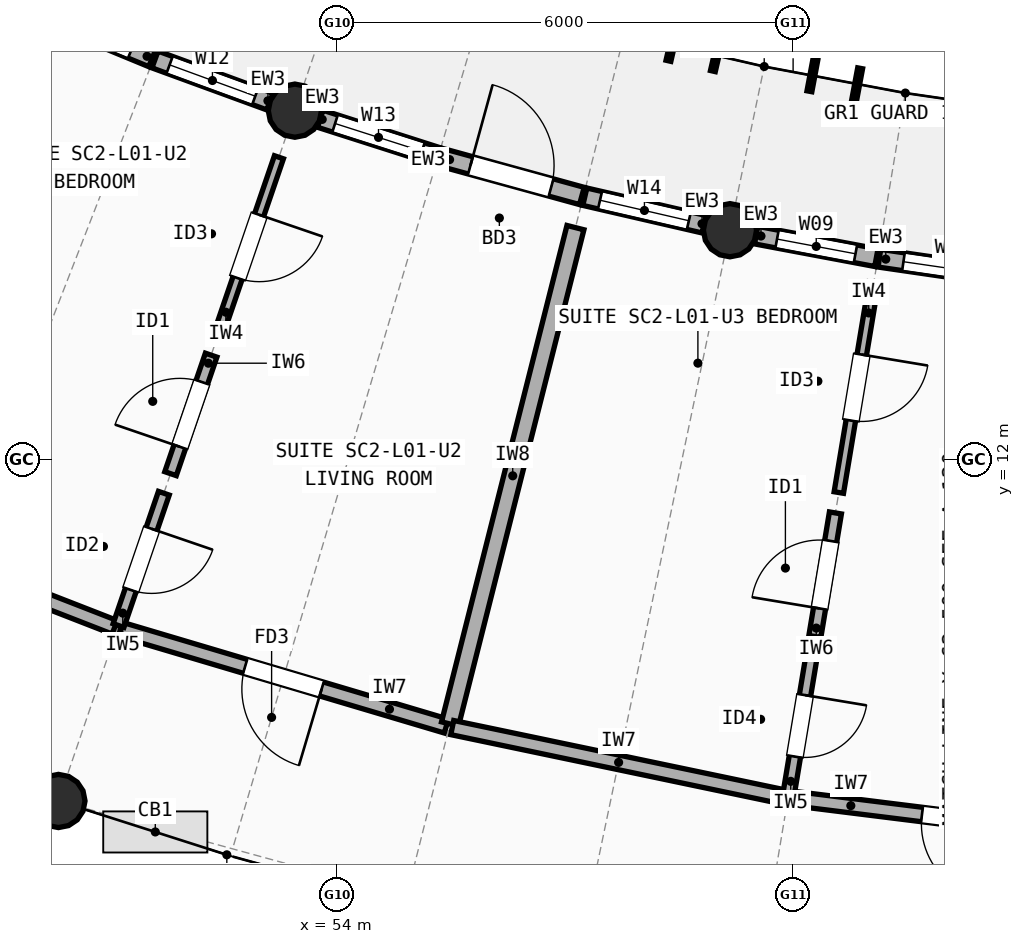
"""IFC4 building model, lengths in metres.
Left out: names, types, materials, properties, quantities, classifications, styles, units other than length and angle.
Written with IfcOpenShell. Run it as: python <this file> out.ifc"""

import sys

from ifc_helpers import new_model, si_unit, direction, frame, frame_2d, origin, origin_2d, place, context, subcontext, project, spatial, rectangle, circle, extrude, element, fill, save


model = new_model("IFC4")
c1 = context("Model", 3, precision=1e-05, world=origin(), true_north=direction((0.0, 1.0)))
c2 = subcontext(c1, "Body", "Model", "MODEL_VIEW")
j1 = project(units=[si_unit("LENGTHUNIT", "METRE"), si_unit("PLANEANGLEUNIT", "RADIAN")], contexts=[c1])
p1 = place(None, origin())
s1 = spatial("IfcSite", under=j1, at=p1, CompositionType="ELEMENT")
p2 = place(p1, origin())
s2 = spatial("IfcBuilding", under=s1, at=p2, CompositionType="ELEMENT")
p3 = place(p2, frame((0.0, 0.0, 4.5)))
s3 = spatial("IfcBuildingStorey", under=s2, at=p3, CompositionType="ELEMENT", Elevation=4.5)
for number, where, z_axis, x_axis in (
    (1, (53.445, 16.59, 0.0), (0.0, 0.0, 1.0), (1.0, 0.0, 0.0)),
    (2, (50.334, 7.508, 0.0), (0.0, 0.0, 1.0), (1.0, 0.0, 0.0)),
    (3, (59.169, 15.018, 0.0), (0.0, 0.0, 1.0), (1.0, 0.0, 0.0)),
):
    element("IfcColumn", number, at=place(p3, frame(where, z_axis=z_axis, x_axis=x_axis)), inside=s3, PredefinedType="COLUMN", context=c2, shape_type="SweptSolid", body=[
        extrude(circle(Radius=0.35, at=origin_2d()), origin(), (0.0, 0.0, 1.0), 2.948),
    ])
p4 = place(p3, frame((49.774, 18.019, 0.0), z_axis=(0.0, 0.0, 1.0), x_axis=(0.92414555515, -0.382040564465, 0.0)))
e4 = element("IfcWall", 4, at=p4, inside=s3, PredefinedType="STANDARD", context=c2, shape_type="SweptSolid", body=[
    extrude(rectangle(XDim=1.94, YDim=0.235, at=frame_2d((0.97, 0.0))), origin(), (0.0, 0.0, 1.0), 2.684),
])
p5 = place(p4, frame((0.295, 0.0, 0.85)))
e5 = element("IfcOpeningElement", 5, at=p5, cuts=e4, PredefinedType="OPENING", context=c2, shape_type="SweptSolid", body=[
    extrude(rectangle(XDim=1.35, YDim=1.5, at=frame_2d((0.675, 0.75))), frame((0.0, 0.127, 0.0), z_axis=(0.0, -1.0, 0.0), x_axis=(1.0, 0.0, 0.0)), (0.0, 0.0, 1.0), 0.255),
])
p6 = place(p3, frame((51.604, 17.264, 0.0), z_axis=(0.0, 0.0, 1.0), x_axis=(0.939176538502, -0.34343475294, 0.0)))
e6 = element("IfcWall", 6, at=p6, inside=s3, PredefinedType="STANDARD", context=c2, shape_type="SweptSolid", body=[
    extrude(rectangle(XDim=1.61, YDim=0.235, at=frame_2d((0.805, 0.0))), origin(), (0.0, 0.0, 1.0), 2.684),
])
p7 = place(p6, frame((0.205, 0.0, 0.85)))
e7 = element("IfcOpeningElement", 7, at=p7, cuts=e6, PredefinedType="OPENING", context=c2, shape_type="SweptSolid", body=[
    extrude(rectangle(XDim=1.2, YDim=1.35, at=frame_2d((0.6, 0.675))), frame((0.0, 0.127, 0.0), z_axis=(0.0, -1.0, 0.0), x_axis=(1.0, 0.0, 0.0)), (0.0, 0.0, 1.0), 0.255),
])
p8 = place(p3, frame((53.778, 16.484, 0.0), z_axis=(0.0, 0.0, 1.0), x_axis=(0.952508629145, -0.304511594861, 0.0)))
e8 = element("IfcWall", 8, at=p8, inside=s3, PredefinedType="STANDARD", context=c2, shape_type="SweptSolid", body=[
    extrude(rectangle(XDim=1.61, YDim=0.235, at=frame_2d((0.805, 0.0))), origin(), (0.0, 0.0, 1.0), 2.684),
])
p9 = place(p8, frame((0.205, 0.0, 0.85)))
e9 = element("IfcOpeningElement", 9, at=p9, cuts=e8, PredefinedType="OPENING", context=c2, shape_type="SweptSolid", body=[
    extrude(rectangle(XDim=1.2, YDim=1.45, at=frame_2d((0.6, 0.725))), frame((0.0, 0.127, 0.0), z_axis=(0.0, -1.0, 0.0), x_axis=(1.0, 0.0, 0.0)), (0.0, 0.0, 1.0), 0.255),
])
p10 = place(p3, frame((55.35, 15.982, 0.0), z_axis=(0.0, 0.0, 1.0), x_axis=(0.964271323293, -0.264916619098, 0.0)))
e10 = element("IfcWall", 10, at=p10, inside=s3, PredefinedType="STANDARD", context=c2, shape_type="SweptSolid", body=[
    extrude(rectangle(XDim=1.94, YDim=0.235, at=frame_2d((0.97, 0.0))), origin(), (0.0, 0.0, 1.0), 2.684),
])
p11 = place(p10, frame((0.42, 0.0, 0.0)))
e11 = element("IfcOpeningElement", 11, at=p11, cuts=e10, PredefinedType="OPENING", context=c2, shape_type="SweptSolid", body=[
    extrude(rectangle(XDim=1.1, YDim=2.15, at=frame_2d((0.55, 1.075))), frame((0.0, 0.127, 0.0), z_axis=(0.0, -1.0, 0.0), x_axis=(1.0, 0.0, 0.0)), (0.0, 0.0, 1.0), 0.255),
])
p12 = place(p3, frame((57.26, 15.458, 0.0), z_axis=(0.0, 0.0, 1.0), x_axis=(0.974355406192, -0.225014538249, 0.0)))
e12 = element("IfcWall", 12, at=p12, inside=s3, PredefinedType="STANDARD", context=c2, shape_type="SweptSolid", body=[
    extrude(rectangle(XDim=1.61, YDim=0.235, at=frame_2d((0.805, 0.0))), origin(), (0.0, 0.0, 1.0), 2.684),
])
p13 = place(p12, frame((0.205, 0.0, 0.85)))
e13 = element("IfcOpeningElement", 13, at=p13, cuts=e12, PredefinedType="OPENING", context=c2, shape_type="SweptSolid", body=[
    extrude(rectangle(XDim=1.2, YDim=1.5, at=frame_2d((0.6, 0.75))), frame((0.0, 0.127, 0.0), z_axis=(0.0, -1.0, 0.0), x_axis=(1.0, 0.0, 0.0)), (0.0, 0.0, 1.0), 0.255),
])
p14 = place(p3, frame((59.513, 14.953, 0.0), z_axis=(0.0, 0.0, 1.0), x_axis=(0.982827529128, -0.184526550902, 0.0)))
e14 = element("IfcWall", 14, at=p14, inside=s3, PredefinedType="STANDARD", context=c2, shape_type="SweptSolid", body=[
    extrude(rectangle(XDim=1.61, YDim=0.235, at=frame_2d((0.805, 0.0))), origin(), (0.0, 0.0, 1.0), 2.684),
])
p15 = place(p14, frame((0.28, 0.0, 0.85)))
e15 = element("IfcOpeningElement", 15, at=p15, cuts=e14, PredefinedType="OPENING", context=c2, shape_type="SweptSolid", body=[
    extrude(rectangle(XDim=1.05, YDim=1.35, at=frame_2d((0.525, 0.675))), frame((0.0, 0.127, 0.0), z_axis=(0.0, -1.0, 0.0), x_axis=(1.0, 0.0, 0.0)), (0.0, 0.0, 1.0), 0.255),
])
p16 = place(p3, frame((61.135, 14.649, 0.0), z_axis=(0.0, 0.0, 1.0), x_axis=(0.989601751146, -0.14383453733, 0.0)))
e16 = element("IfcWall", 16, at=p16, inside=s3, PredefinedType="STANDARD", context=c2, shape_type="SweptSolid", body=[
    extrude(rectangle(XDim=1.94, YDim=0.235, at=frame_2d((0.97, 0.0))), origin(), (0.0, 0.0, 1.0), 2.684),
])
p17 = place(p16, frame((0.32, 0.0, 0.85)))
e17 = element("IfcOpeningElement", 17, at=p17, cuts=e16, PredefinedType="OPENING", context=c2, shape_type="SweptSolid", body=[
    extrude(rectangle(XDim=1.3, YDim=1.45, at=frame_2d((0.65, 0.725))), frame((0.0, 0.127, 0.0), z_axis=(0.0, -1.0, 0.0), x_axis=(1.0, 0.0, 0.0)), (0.0, 0.0, 1.0), 0.255),
])
p18 = place(p3, frame((46.906, 11.417, 0.0), z_axis=(0.0, 0.0, 1.0), x_axis=(0.931847867525, -0.362849213571, 0.0)))
e18 = element("IfcWall", 18, at=p18, inside=s3, PredefinedType="SOLIDWALL", context=c2, shape_type="SweptSolid", body=[
    extrude(rectangle(XDim=4.473, YDim=0.19, at=frame_2d((2.237, 0.0))), origin(), (0.0, 0.0, 1.0), 2.762),
])
p19 = place(p3, frame((51.15, 9.768, 0.0), z_axis=(0.0, 0.0, 1.0), x_axis=(0.958602413557, -0.28474798107, 0.0)))
e19 = element("IfcWall", 19, at=p19, inside=s3, PredefinedType="SOLIDWALL", context=c2, shape_type="SweptSolid", body=[
    extrude(rectangle(XDim=4.473, YDim=0.19, at=frame_2d((2.236, 0.0))), origin(), (0.0, 0.0, 1.0), 2.742),
])
p20 = place(p19, frame((1.711, 0.0, 0.0)))
e20 = element("IfcOpeningElement", 20, at=p20, cuts=e19, PredefinedType="OPENING", context=c2, shape_type="SweptSolid", body=[
    extrude(rectangle(XDim=1.05, YDim=2.15, at=frame_2d((0.525, 1.075))), frame((0.0, 0.105, 0.0), z_axis=(0.0, -1.0, 0.0), x_axis=(1.0, 0.0, 0.0)), (0.0, 0.0, 1.0), 0.21),
])
p21 = place(p3, frame((53.235, 15.977, 0.0), z_axis=(0.0, 0.0, 1.0), x_axis=(-0.324072633759, -0.946032202437, 0.0)))
e21 = element("IfcWall", 21, at=p21, inside=s3, PredefinedType="PARTITIONING", context=c2, shape_type="SweptSolid", body=[
    extrude(rectangle(XDim=2.48, YDim=0.125, at=frame_2d((1.24, 0.0))), origin(), (0.0, 0.0, 1.0), 2.722),
])
p22 = place(p21, frame((0.8, 0.0, 0.0)))
e22 = element("IfcOpeningElement", 22, at=p22, cuts=e21, PredefinedType="OPENING", context=c2, shape_type="SweptSolid", body=[
    extrude(rectangle(XDim=0.88, YDim=2.1, at=frame_2d((0.44, 1.05))), frame((0.0, 0.073, 0.0), z_axis=(0.0, -1.0, 0.0), x_axis=(1.0, 0.0, 0.0)), (0.0, 0.0, 1.0), 0.145),
])
p23 = place(p3, frame((52.343, 13.374, 0.0), z_axis=(0.0, 0.0, 1.0), x_axis=(-0.324127376206, -0.946013448104, 0.0)))
e23 = element("IfcWall", 23, at=p23, inside=s3, PredefinedType="PLUMBINGWALL", context=c2, shape_type="SweptSolid", body=[
    extrude(rectangle(XDim=1.648, YDim=0.16, at=frame_2d((0.824, 0.0))), origin(), (0.0, 0.0, 1.0), 2.722),
])
p24 = place(p23, frame((0.374, 0.0, 0.0)))
e24 = element("IfcOpeningElement", 24, at=p24, cuts=e23, PredefinedType="OPENING", context=c2, shape_type="SweptSolid", body=[
    extrude(rectangle(XDim=0.9, YDim=2.1, at=frame_2d((0.45, 1.05))), frame((0.0, 0.09, 0.0), z_axis=(0.0, -1.0, 0.0), x_axis=(1.0, 0.0, 0.0)), (0.0, 0.0, 1.0), 0.18),
])
p25 = place(p3, frame((51.721, 11.558, 0.0), z_axis=(0.0, 0.0, 1.0), x_axis=(-0.323978335312, -0.946064500046, 0.0)))
e25 = element("IfcWall", 25, at=p25, inside=s3, PredefinedType="PARTITIONING", context=c2, shape_type="SweptSolid", body=[
    extrude(rectangle(XDim=1.84, YDim=0.15, at=frame_2d((0.92, 0.0))), origin(), (0.0, 0.0, 1.0), 2.722),
])
p26 = place(p25, frame((0.495, 0.0, 0.0)))
e26 = element("IfcOpeningElement", 26, at=p26, cuts=e25, PredefinedType="OPENING", context=c2, shape_type="SweptSolid", body=[
    extrude(rectangle(XDim=0.85, YDim=2.1, at=frame_2d((0.425, 1.05))), frame((0.0, 0.085, 0.0), z_axis=(0.0, -1.0, 0.0), x_axis=(1.0, 0.0, 0.0)), (0.0, 0.0, 1.0), 0.17),
])
p27 = place(p3, frame((57.136, 15.052, 0.0), z_axis=(0.0, 0.0, 1.0), x_axis=(-0.244982481903, -0.969527505314, 0.0)))
e27 = element("IfcWall", 27, at=p27, inside=s3, PredefinedType="SOLIDWALL", context=c2, shape_type="SweptSolid", body=[
    extrude(rectangle(XDim=6.736, YDim=0.23, at=frame_2d((3.368, 0.0))), origin(), (0.0, 0.0, 1.0), 2.762),
])
p28 = place(p3, frame((55.515, 8.474, 0.0), z_axis=(0.0, 0.0, 1.0), x_axis=(0.978806148413, -0.204788973894, 0.0)))
e28 = element("IfcWall", 28, at=p28, inside=s3, PredefinedType="SOLIDWALL", context=c2, shape_type="SweptSolid", body=[
    extrude(rectangle(XDim=4.473, YDim=0.19, at=frame_2d((2.236, 0.0))), origin(), (0.0, 0.0, 1.0), 2.722),
])
p29 = place(p3, frame((59.972, 7.545, 0.0), z_axis=(0.0, 0.0, 1.0), x_axis=(0.992349920368, -0.123457019023, 0.0)))
e29 = element("IfcWall", 29, at=p29, inside=s3, PredefinedType="SOLIDWALL", context=c2, shape_type="SweptSolid", body=[
    extrude(rectangle(XDim=4.473, YDim=0.19, at=frame_2d((2.237, 0.0))), origin(), (0.0, 0.0, 1.0), 2.762),
])
p30 = place(p29, frame((1.737, 0.0, 0.0)))
e30 = element("IfcOpeningElement", 30, at=p30, cuts=e29, PredefinedType="OPENING", context=c2, shape_type="SweptSolid", body=[
    extrude(rectangle(XDim=1.0, YDim=2.15, at=frame_2d((0.5, 1.075))), frame((0.0, 0.105, 0.0), z_axis=(0.0, -1.0, 0.0), x_axis=(1.0, 0.0, 0.0)), (0.0, 0.0, 1.0), 0.21),
])
p31 = place(p3, frame((61.061, 14.328, 0.0), z_axis=(0.0, 0.0, 1.0), x_axis=(-0.164186889233, -0.986429250075, 0.0)))
e31 = element("IfcWall", 31, at=p31, inside=s3, PredefinedType="PARTITIONING", context=c2, shape_type="SweptSolid", body=[
    extrude(rectangle(XDim=2.8, YDim=0.125, at=frame_2d((1.4, 0.0))), origin(), (0.0, 0.0, 1.0), 2.742),
])
p32 = place(p31, frame((0.96, 0.0, 0.0)))
e32 = element("IfcOpeningElement", 32, at=p32, cuts=e31, PredefinedType="OPENING", context=c2, shape_type="SweptSolid", body=[
    extrude(rectangle(XDim=0.88, YDim=2.1, at=frame_2d((0.44, 1.05))), frame((0.0, 0.073, 0.0), z_axis=(0.0, -1.0, 0.0), x_axis=(1.0, 0.0, 0.0)), (0.0, 0.0, 1.0), 0.145),
])
p33 = place(p3, frame((60.557, 11.298, 0.0), z_axis=(0.0, 0.0, 1.0), x_axis=(-0.164158726706, -0.986433937193, 0.0)))
e33 = element("IfcWall", 33, at=p33, inside=s3, PredefinedType="PLUMBINGWALL", context=c2, shape_type="SweptSolid", body=[
    extrude(rectangle(XDim=1.648, YDim=0.16, at=frame_2d((0.824, 0.0))), origin(), (0.0, 0.0, 1.0), 2.742),
])
p34 = place(p33, frame((0.374, 0.0, 0.0)))
e34 = element("IfcOpeningElement", 34, at=p34, cuts=e33, PredefinedType="OPENING", context=c2, shape_type="SweptSolid", body=[
    extrude(rectangle(XDim=0.9, YDim=2.1, at=frame_2d((0.45, 1.05))), frame((0.0, 0.09, 0.0), z_axis=(0.0, -1.0, 0.0), x_axis=(1.0, 0.0, 0.0)), (0.0, 0.0, 1.0), 0.18),
])
p35 = place(p3, frame((60.241, 9.404, 0.0), z_axis=(0.0, 0.0, 1.0), x_axis=(-0.16414076901, -0.986436925479, 0.0)))
e35 = element("IfcWall", 35, at=p35, inside=s3, PredefinedType="PARTITIONING", context=c2, shape_type="SweptSolid", body=[
    extrude(rectangle(XDim=1.84, YDim=0.15, at=frame_2d((0.92, 0.0))), origin(), (0.0, 0.0, 1.0), 2.742),
])
p36 = place(p35, frame((0.51, 0.0, 0.0)))
e36 = element("IfcOpeningElement", 36, at=p36, cuts=e35, PredefinedType="OPENING", context=c2, shape_type="SweptSolid", body=[
    extrude(rectangle(XDim=0.82, YDim=2.08, at=frame_2d((0.41, 1.04))), frame((0.0, 0.085, 0.0), z_axis=(0.0, -1.0, 0.0), x_axis=(1.0, 0.0, 0.0)), (0.0, 0.0, 1.0), 0.17),
])
p37 = place(p7, origin())
e37 = element("IfcWindow", 37, at=p37, inside=s3, PartitioningType="SINGLE_PANEL", PredefinedType="WINDOW", context=c2, shape_type="SweptSolid", body=[
    extrude(rectangle(XDim=1.2, YDim=1.35, at=frame_2d((0.6, 0.675))), frame((0.0, 0.03, 0.0), z_axis=(0.0, -1.0, 0.0), x_axis=(1.0, 0.0, 0.0)), (0.0, 0.0, 1.0), 0.06),
])
fill(e7, e37)
p38 = place(p9, origin())
e38 = element("IfcWindow", 38, at=p38, inside=s3, PartitioningType="SINGLE_PANEL", PredefinedType="WINDOW", context=c2, shape_type="SweptSolid", body=[
    extrude(rectangle(XDim=1.2, YDim=1.45, at=frame_2d((0.6, 0.725))), frame((0.0, 0.03, 0.0), z_axis=(0.0, -1.0, 0.0), x_axis=(1.0, 0.0, 0.0)), (0.0, 0.0, 1.0), 0.06),
])
fill(e9, e38)
p39 = place(p11, origin())
e39 = element("IfcDoor", 39, at=p39, inside=s3, OperationType="SINGLE_SWING_LEFT", PredefinedType="DOOR", context=c2, shape_type="SweptSolid", body=[
    extrude(rectangle(XDim=1.1, YDim=2.15, at=frame_2d((0.55, 1.075))), frame((0.0, 0.025, 0.0), z_axis=(0.0, -1.0, 0.0), x_axis=(1.0, 0.0, 0.0)), (0.0, 0.0, 1.0), 0.05),
])
fill(e11, e39)
p40 = place(p13, origin())
e40 = element("IfcWindow", 40, at=p40, inside=s3, PartitioningType="SINGLE_PANEL", PredefinedType="WINDOW", context=c2, shape_type="SweptSolid", body=[
    extrude(rectangle(XDim=1.2, YDim=1.5, at=frame_2d((0.6, 0.75))), frame((0.0, 0.03, 0.0), z_axis=(0.0, -1.0, 0.0), x_axis=(1.0, 0.0, 0.0)), (0.0, 0.0, 1.0), 0.06),
])
fill(e13, e40)
p41 = place(p15, origin())
e41 = element("IfcWindow", 41, at=p41, inside=s3, PartitioningType="SINGLE_PANEL", PredefinedType="WINDOW", context=c2, shape_type="SweptSolid", body=[
    extrude(rectangle(XDim=1.05, YDim=1.35, at=frame_2d((0.525, 0.675))), frame((0.0, 0.03, 0.0), z_axis=(0.0, -1.0, 0.0), x_axis=(1.0, 0.0, 0.0)), (0.0, 0.0, 1.0), 0.06),
])
fill(e15, e41)
p42 = place(p17, origin())
e42 = element("IfcWindow", 42, at=p42, inside=s3, PartitioningType="SINGLE_PANEL", PredefinedType="WINDOW", context=c2, shape_type="SweptSolid", body=[
    extrude(rectangle(XDim=1.3, YDim=1.45, at=frame_2d((0.65, 0.725))), frame((0.0, 0.03, 0.0), z_axis=(0.0, -1.0, 0.0), x_axis=(1.0, 0.0, 0.0)), (0.0, 0.0, 1.0), 0.06),
])
fill(e17, e42)
p43 = place(p20, origin())
e43 = element("IfcDoor", 43, at=p43, inside=s3, OperationType="SINGLE_SWING_RIGHT", PredefinedType="DOOR", context=c2, shape_type="SweptSolid", body=[
    extrude(rectangle(XDim=1.05, YDim=2.15, at=frame_2d((0.525, 1.075))), frame((0.0, 0.025, 0.0), z_axis=(0.0, -1.0, 0.0), x_axis=(1.0, 0.0, 0.0)), (0.0, 0.0, 1.0), 0.05),
])
fill(e20, e43)
p44 = place(p22, origin())
e44 = element("IfcDoor", 44, at=p44, inside=s3, OperationType="SINGLE_SWING_LEFT", PredefinedType="DOOR", context=c2, shape_type="SweptSolid", body=[
    extrude(rectangle(XDim=0.88, YDim=2.1, at=frame_2d((0.44, 1.05))), frame((0.0, 0.025, 0.0), z_axis=(0.0, -1.0, 0.0), x_axis=(1.0, 0.0, 0.0)), (0.0, 0.0, 1.0), 0.05),
])
fill(e22, e44)
p45 = place(p24, origin())
e45 = element("IfcDoor", 45, at=p45, inside=s3, OperationType="SINGLE_SWING_RIGHT", PredefinedType="DOOR", context=c2, shape_type="SweptSolid", body=[
    extrude(rectangle(XDim=0.9, YDim=2.1, at=frame_2d((0.45, 1.05))), frame((0.0, 0.025, 0.0), z_axis=(0.0, -1.0, 0.0), x_axis=(1.0, 0.0, 0.0)), (0.0, 0.0, 1.0), 0.05),
])
fill(e24, e45)
p46 = place(p26, origin())
e46 = element("IfcDoor", 46, at=p46, inside=s3, OperationType="SINGLE_SWING_LEFT", PredefinedType="DOOR", context=c2, shape_type="SweptSolid", body=[
    extrude(rectangle(XDim=0.85, YDim=2.1, at=frame_2d((0.425, 1.05))), frame((0.0, 0.025, 0.0), z_axis=(0.0, -1.0, 0.0), x_axis=(1.0, 0.0, 0.0)), (0.0, 0.0, 1.0), 0.05),
])
fill(e26, e46)
p47 = place(p30, origin())
e47 = element("IfcDoor", 47, at=p47, inside=s3, OperationType="SINGLE_SWING_RIGHT", PredefinedType="DOOR", context=c2, shape_type="SweptSolid", body=[
    extrude(rectangle(XDim=1.0, YDim=2.15, at=frame_2d((0.5, 1.075))), frame((0.0, 0.025, 0.0), z_axis=(0.0, -1.0, 0.0), x_axis=(1.0, 0.0, 0.0)), (0.0, 0.0, 1.0), 0.05),
])
fill(e30, e47)
p48 = place(p32, origin())
e48 = element("IfcDoor", 48, at=p48, inside=s3, OperationType="SINGLE_SWING_LEFT", PredefinedType="DOOR", context=c2, shape_type="SweptSolid", body=[
    extrude(rectangle(XDim=0.88, YDim=2.1, at=frame_2d((0.44, 1.05))), frame((0.0, 0.025, 0.0), z_axis=(0.0, -1.0, 0.0), x_axis=(1.0, 0.0, 0.0)), (0.0, 0.0, 1.0), 0.05),
])
fill(e32, e48)
p49 = place(p34, origin())
e49 = element("IfcDoor", 49, at=p49, inside=s3, OperationType="SINGLE_SWING_RIGHT", PredefinedType="DOOR", context=c2, shape_type="SweptSolid", body=[
    extrude(rectangle(XDim=0.9, YDim=2.1, at=frame_2d((0.45, 1.05))), frame((0.0, 0.025, 0.0), z_axis=(0.0, -1.0, 0.0), x_axis=(1.0, 0.0, 0.0)), (0.0, 0.0, 1.0), 0.05),
])
fill(e34, e49)
p50 = place(p36, origin())
e50 = element("IfcDoor", 50, at=p50, inside=s3, OperationType="SINGLE_SWING_LEFT", PredefinedType="DOOR", context=c2, shape_type="SweptSolid", body=[
    extrude(rectangle(XDim=0.82, YDim=2.08, at=frame_2d((0.41, 1.04))), frame((0.0, 0.025, 0.0), z_axis=(0.0, -1.0, 0.0), x_axis=(1.0, 0.0, 0.0)), (0.0, 0.0, 1.0), 0.05),
])
fill(e36, e50)
save(model, sys.argv[1])
